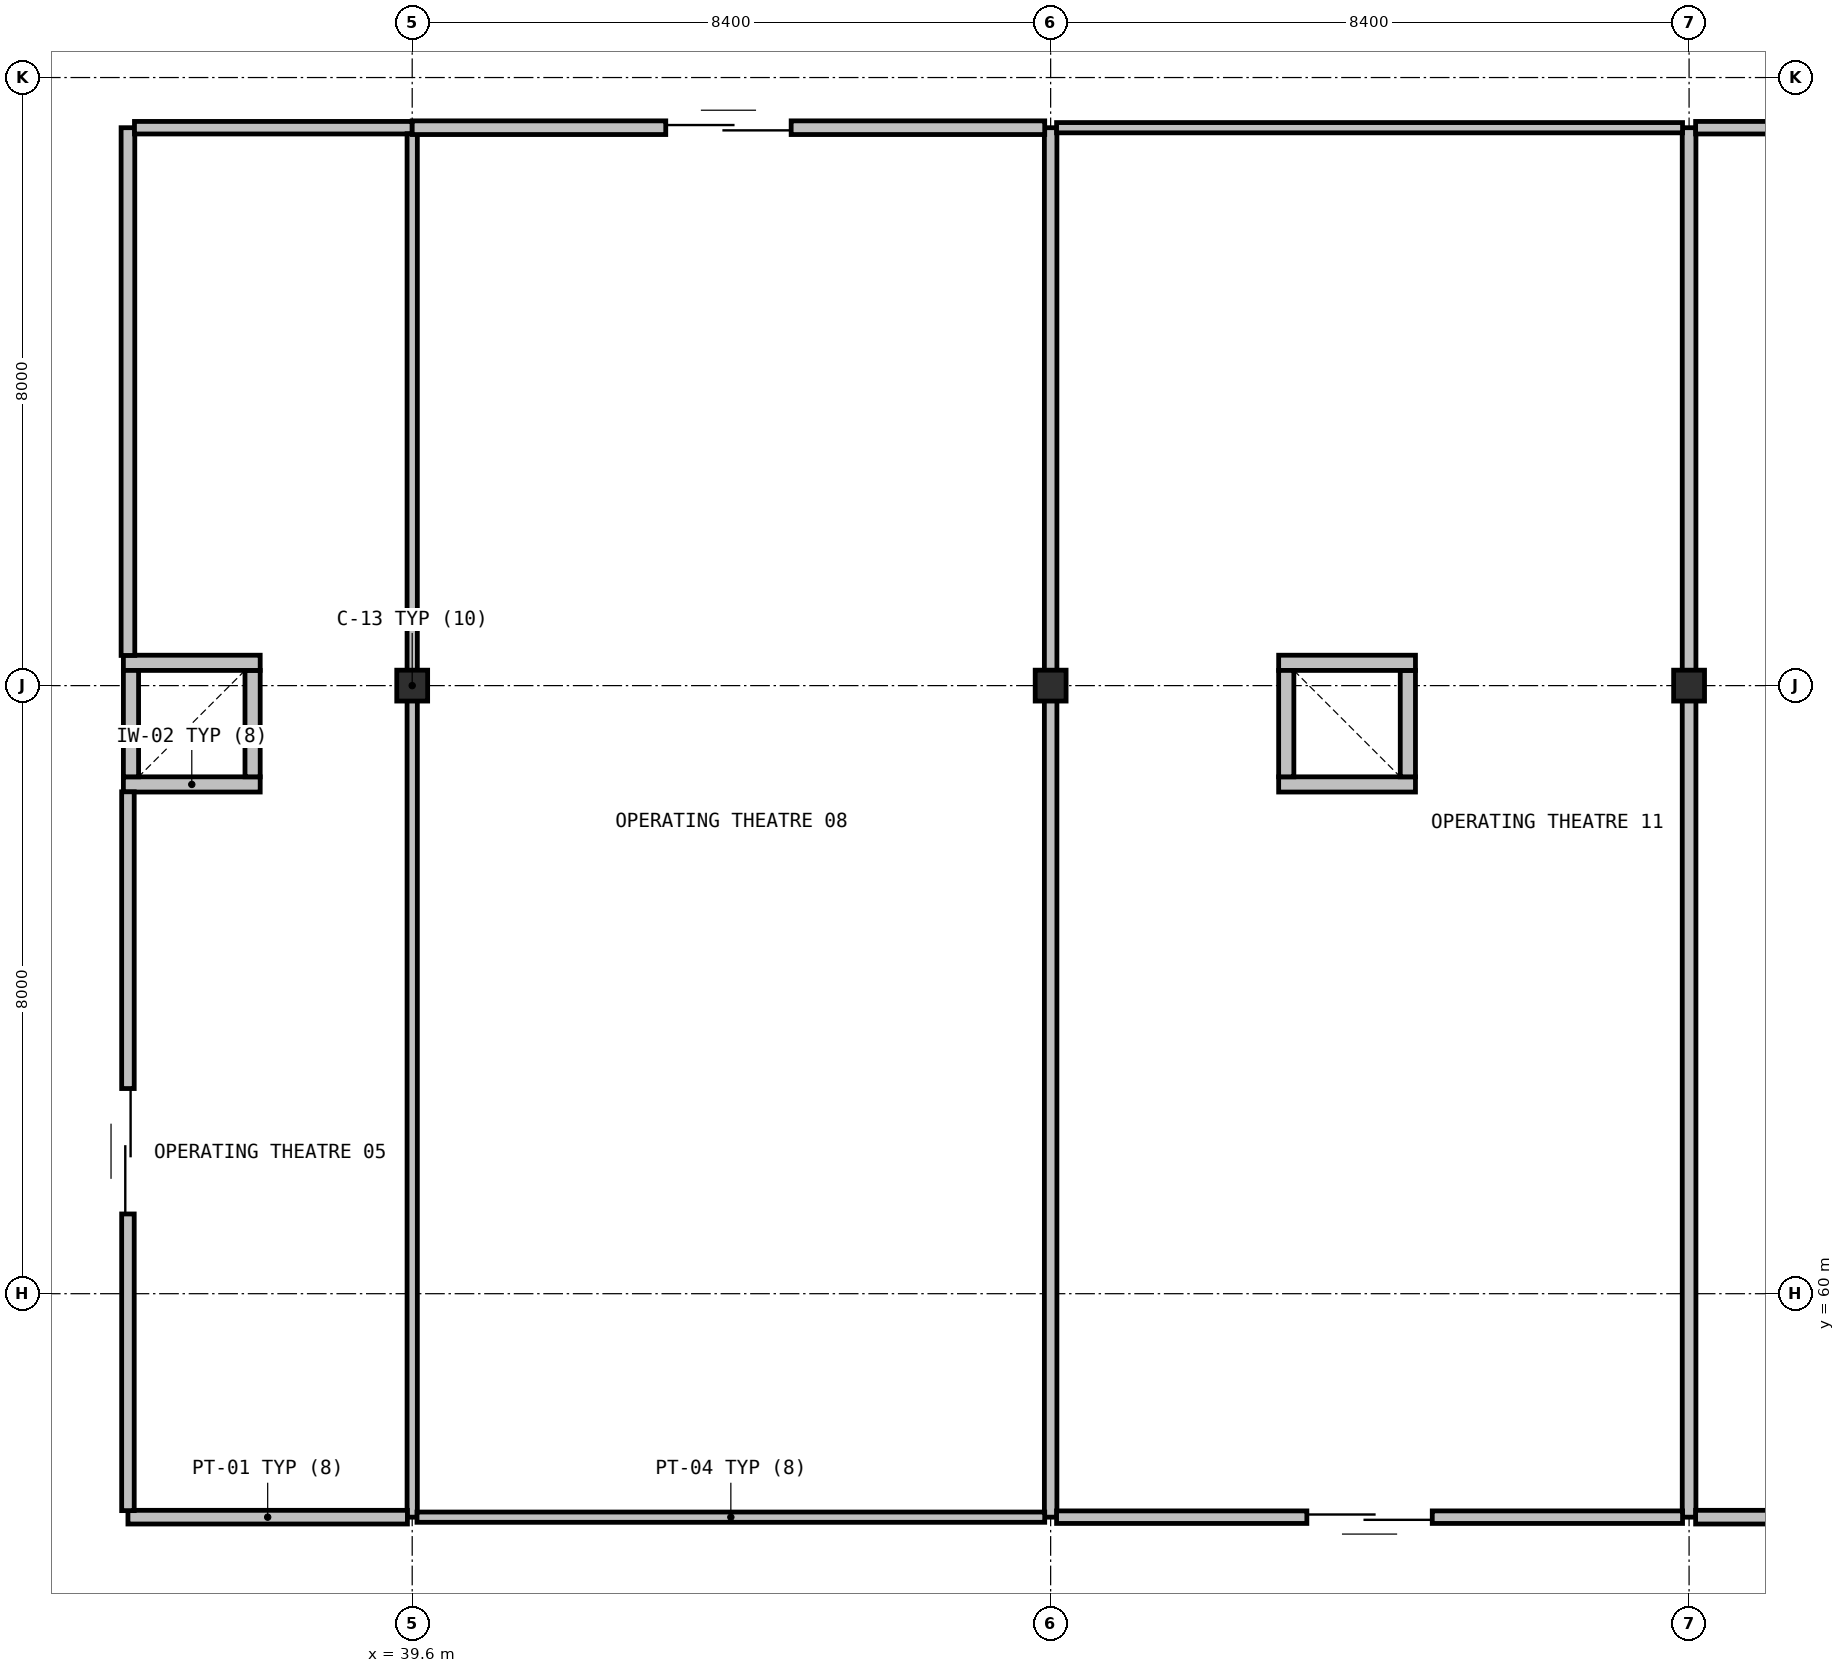
"""IFC4 building model, lengths in metres.
Left out: names, types, materials, properties, quantities, classifications, styles, units other than length and angle.
Written with IfcOpenShell. Run it as: python <this file> out.ifc"""

import sys

from ifc_helpers import new_model, si_unit, direction, frame, frame_2d, origin, origin_2d, place, context, subcontext, project, spatial, rectangle, hollow_circle, extrude, element, fill, save


model = new_model("IFC4")
c1 = context("Model", 3, precision=1e-05, world=origin(), true_north=direction((0.0, 1.0)))
c2 = subcontext(c1, "Body", "Model", "MODEL_VIEW")
j1 = project(units=[si_unit("LENGTHUNIT", "METRE"), si_unit("PLANEANGLEUNIT", "RADIAN")], contexts=[c1])
p1 = place(None, origin())
s1 = spatial("IfcSite", under=j1, at=p1, CompositionType="ELEMENT")
p2 = place(p1, origin())
s2 = spatial("IfcBuilding", under=s1, at=p2, CompositionType="ELEMENT")
p3 = place(p2, frame((0.0, 0.0, 10.2)))
s3 = spatial("IfcBuildingStorey", under=s2, at=p3, CompositionType="ELEMENT", Elevation=10.2)
for number, where, z_axis, x_axis in (
    (1, (39.6, 68.0, 0.0), (0.0, 0.0, 1.0), (1.0, 0.0, 0.0)),
    (2, (48.0, 68.0, 0.0), (0.0, 0.0, 1.0), (1.0, 0.0, 0.0)),
    (3, (56.4, 68.0, 0.0), (0.0, 0.0, 1.0), (1.0, 0.0, 0.0)),
):
    element("IfcColumn", number, at=place(p3, frame(where, z_axis=z_axis, x_axis=x_axis)), inside=s3, PredefinedType="COLUMN", context=c2, shape_type="SweptSolid", body=[
        extrude(hollow_circle(Radius=0.203, WallThickness=0.016, at=origin_2d()), origin(), (0.0, 0.0, 1.0), 4.8),
    ])
p4 = place(p3, frame((51.0, 66.7, 0.0), z_axis=(0.0, 0.0, 1.0), x_axis=(1.0, 0.0, 0.0)))
e4 = element("IfcWall", 4, at=p4, inside=s3, PredefinedType="SOLIDWALL", context=c2, shape_type="SweptSolid", body=[
    extrude(rectangle(XDim=1.8, YDim=0.2, at=frame_2d((0.9, 0.0))), origin(), (0.0, 0.0, 1.0), 4.46),
])
p5 = place(p3, frame((52.7, 66.8, 0.0), z_axis=(0.0, 0.0, 1.0), x_axis=(0.0, 1.0, 0.0)))
e5 = element("IfcWall", 5, at=p5, inside=s3, PredefinedType="SOLIDWALL", context=c2, shape_type="SweptSolid", body=[
    extrude(rectangle(XDim=1.4, YDim=0.2, at=frame_2d((0.7, 0.0))), origin(), (0.0, 0.0, 1.0), 4.46),
])
p6 = place(p3, frame((52.8, 68.3, 0.0), z_axis=(0.0, 0.0, 1.0), x_axis=(-1.0, 0.0, 0.0)))
e6 = element("IfcWall", 6, at=p6, inside=s3, PredefinedType="SOLIDWALL", context=c2, shape_type="SweptSolid", body=[
    extrude(rectangle(XDim=1.8, YDim=0.2, at=frame_2d((0.9, 0.0))), origin(), (0.0, 0.0, 1.0), 4.46),
])
p7 = place(p3, frame((51.1, 68.2, 0.0), z_axis=(0.0, 0.0, 1.0), x_axis=(0.0, -1.0, 0.0)))
e7 = element("IfcWall", 7, at=p7, inside=s3, PredefinedType="SOLIDWALL", context=c2, shape_type="SweptSolid", body=[
    extrude(rectangle(XDim=1.4, YDim=0.2, at=frame_2d((0.7, 0.0))), origin(), (0.0, 0.0, 1.0), 4.46),
])
p8 = place(p3, frame((35.8, 66.7, 0.0), z_axis=(0.0, 0.0, 1.0), x_axis=(1.0, 0.0, 0.0)))
e8 = element("IfcWall", 8, at=p8, inside=s3, PredefinedType="SOLIDWALL", context=c2, shape_type="SweptSolid", body=[
    extrude(rectangle(XDim=1.8, YDim=0.2, at=frame_2d((0.9, 0.0))), origin(), (0.0, 0.0, 1.0), 4.46),
])
p9 = place(p3, frame((37.5, 66.8, 0.0), z_axis=(0.0, 0.0, 1.0), x_axis=(0.0, 1.0, 0.0)))
e9 = element("IfcWall", 9, at=p9, inside=s3, PredefinedType="SOLIDWALL", context=c2, shape_type="SweptSolid", body=[
    extrude(rectangle(XDim=1.4, YDim=0.2, at=frame_2d((0.7, 0.0))), origin(), (0.0, 0.0, 1.0), 4.46),
])
p10 = place(p3, frame((37.6, 68.3, 0.0), z_axis=(0.0, 0.0, 1.0), x_axis=(-1.0, 0.0, 0.0)))
e10 = element("IfcWall", 10, at=p10, inside=s3, PredefinedType="SOLIDWALL", context=c2, shape_type="SweptSolid", body=[
    extrude(rectangle(XDim=1.8, YDim=0.2, at=frame_2d((0.9, 0.0))), origin(), (0.0, 0.0, 1.0), 4.46),
])
p11 = place(p3, frame((35.9, 68.2, 0.0), z_axis=(0.0, 0.0, 1.0), x_axis=(0.0, -1.0, 0.0)))
e11 = element("IfcWall", 11, at=p11, inside=s3, PredefinedType="SOLIDWALL", context=c2, shape_type="SweptSolid", body=[
    extrude(rectangle(XDim=1.4, YDim=0.2, at=frame_2d((0.7, 0.0))), origin(), (0.0, 0.0, 1.0), 4.46),
])
p12 = place(p3, frame((35.86, 68.397, 0.0), z_axis=(0.0, 0.0, 1.0), x_axis=(0.0, 1.0, 0.0)))
e12 = element("IfcWall", 12, at=p12, inside=s3, PredefinedType="PARTITIONING", context=c2, shape_type="SweptSolid", body=[
    extrude(rectangle(XDim=6.943, YDim=0.18, at=frame_2d((3.472, 0.0))), origin(), (0.0, 0.0, 1.0), 4.46),
])
p13 = place(p3, frame((35.946, 75.34, 0.0), z_axis=(0.0, 0.0, 1.0), x_axis=(1.0, 0.0, 0.0)))
e13 = element("IfcWall", 13, at=p13, inside=s3, PredefinedType="PARTITIONING", context=c2, shape_type="SweptSolid", body=[
    extrude(rectangle(XDim=3.654, YDim=0.165, at=frame_2d((1.827, 0.0))), origin(), (0.0, 0.0, 1.0), 4.46),
])
p14 = place(p3, frame((39.6, 75.261, 0.0), z_axis=(0.0, 0.0, 1.0), x_axis=(0.0, -1.0, 0.0)))
e14 = element("IfcWall", 14, at=p14, inside=s3, PredefinedType="PARTITIONING", context=c2, shape_type="SweptSolid", body=[
    extrude(rectangle(XDim=18.201, YDim=0.135, at=frame_2d((9.101, 0.0))), origin(), (0.0, 0.0, 1.0), 3.665),
])
p15 = place(p3, frame((39.537, 57.06, 0.0), z_axis=(0.0, 0.0, 1.0), x_axis=(-1.0, 0.0, 0.0)))
e15 = element("IfcWall", 15, at=p15, inside=s3, PredefinedType="PARTITIONING", context=c2, shape_type="SweptSolid", body=[
    extrude(rectangle(XDim=3.677, YDim=0.18, at=frame_2d((1.838, 0.0))), origin(), (0.0, 0.0, 1.0), 4.46),
])
p16 = place(p3, frame((35.86, 57.146, 0.0), z_axis=(0.0, 0.0, 1.0), x_axis=(0.0, 1.0, 0.0)))
e16 = element("IfcWall", 16, at=p16, inside=s3, PredefinedType="PARTITIONING", context=c2, shape_type="SweptSolid", body=[
    extrude(rectangle(XDim=9.457, YDim=0.165, at=frame_2d((4.729, 0.0))), origin(), (0.0, 0.0, 1.0), 4.46),
])
p17 = place(p16, frame((3.903, 0.0, 0.0)))
e17 = element("IfcOpeningElement", 17, at=p17, cuts=e16, PredefinedType="OPENING", context=c2, shape_type="SweptSolid", body=[
    extrude(rectangle(XDim=1.65, YDim=2.2, at=frame_2d((0.825, 1.1))), frame((0.0, 0.093, 0.0), z_axis=(0.0, -1.0, 0.0), x_axis=(1.0, 0.0, 0.0)), (0.0, 0.0, 1.0), 0.185),
])
p18 = place(p3, frame((48.0, 75.34, 0.0), z_axis=(0.0, 0.0, 1.0), x_axis=(0.0, -1.0, 0.0)))
e18 = element("IfcWall", 18, at=p18, inside=s3, PredefinedType="PARTITIONING", context=c2, shape_type="SweptSolid", body=[
    extrude(rectangle(XDim=18.28, YDim=0.165, at=frame_2d((9.14, 0.0))), origin(), (0.0, 0.0, 1.0), 3.665),
])
p19 = place(p3, frame((47.922, 57.06, 0.0), z_axis=(0.0, 0.0, 1.0), x_axis=(-1.0, 0.0, 0.0)))
e19 = element("IfcWall", 19, at=p19, inside=s3, PredefinedType="PARTITIONING", context=c2, shape_type="SweptSolid", body=[
    extrude(rectangle(XDim=8.259, YDim=0.135, at=frame_2d((4.129, 0.0))), origin(), (0.0, 0.0, 1.0), 4.46),
])
p20 = place(p3, frame((39.6, 75.34, 0.0), z_axis=(0.0, 0.0, 1.0), x_axis=(1.0, 0.0, 0.0)))
e20 = element("IfcWall", 20, at=p20, inside=s3, PredefinedType="PARTITIONING", context=c2, shape_type="SweptSolid", body=[
    extrude(rectangle(XDim=8.322, YDim=0.18, at=frame_2d((4.161, 0.0))), origin(), (0.0, 0.0, 1.0), 4.46),
])
p21 = place(p20, frame((3.336, 0.0, 0.0)))
e21 = element("IfcOpeningElement", 21, at=p21, cuts=e20, PredefinedType="OPENING", context=c2, shape_type="SweptSolid", body=[
    extrude(rectangle(XDim=1.65, YDim=2.2, at=frame_2d((0.825, 1.1))), frame((0.0, 0.1, 0.0), z_axis=(0.0, -1.0, 0.0), x_axis=(1.0, 0.0, 0.0)), (0.0, 0.0, 1.0), 0.2),
])
p22 = place(p3, frame((56.4, 75.34, 0.0), z_axis=(0.0, 0.0, 1.0), x_axis=(0.0, -1.0, 0.0)))
e22 = element("IfcWall", 22, at=p22, inside=s3, PredefinedType="PARTITIONING", context=c2, shape_type="SweptSolid", body=[
    extrude(rectangle(XDim=18.28, YDim=0.18, at=frame_2d((9.14, 0.0))), origin(), (0.0, 0.0, 1.0), 3.665),
])
p23 = place(p3, frame((56.314, 57.06, 0.0), z_axis=(0.0, 0.0, 1.0), x_axis=(-1.0, 0.0, 0.0)))
e23 = element("IfcWall", 23, at=p23, inside=s3, PredefinedType="PARTITIONING", context=c2, shape_type="SweptSolid", body=[
    extrude(rectangle(XDim=8.236, YDim=0.165, at=frame_2d((4.118, 0.0))), origin(), (0.0, 0.0, 1.0), 4.46),
])
p24 = place(p23, frame((3.293, 0.0, 0.0)))
e24 = element("IfcOpeningElement", 24, at=p24, cuts=e23, PredefinedType="OPENING", context=c2, shape_type="SweptSolid", body=[
    extrude(rectangle(XDim=1.65, YDim=2.2, at=frame_2d((0.825, 1.1))), frame((0.0, 0.093, 0.0), z_axis=(0.0, -1.0, 0.0), x_axis=(1.0, 0.0, 0.0)), (0.0, 0.0, 1.0), 0.185),
])
p25 = place(p3, frame((48.078, 75.34, 0.0), z_axis=(0.0, 0.0, 1.0), x_axis=(1.0, 0.0, 0.0)))
e25 = element("IfcWall", 25, at=p25, inside=s3, PredefinedType="PARTITIONING", context=c2, shape_type="SweptSolid", body=[
    extrude(rectangle(XDim=8.236, YDim=0.135, at=frame_2d((4.118, 0.0))), origin(), (0.0, 0.0, 1.0), 4.46),
])
p26 = place(p3, frame((64.736, 57.06, 0.0), z_axis=(0.0, 0.0, 1.0), x_axis=(-1.0, 0.0, 0.0)))
e26 = element("IfcWall", 26, at=p26, inside=s3, PredefinedType="PARTITIONING", context=c2, shape_type="SweptSolid", body=[
    extrude(rectangle(XDim=8.25, YDim=0.18, at=frame_2d((4.125, 0.0))), origin(), (0.0, 0.0, 1.0), 4.46),
])
p27 = place(p26, frame((3.3, 0.0, 0.0)))
e27 = element("IfcOpeningElement", 27, at=p27, cuts=e26, PredefinedType="OPENING", context=c2, shape_type="SweptSolid", body=[
    extrude(rectangle(XDim=1.65, YDim=2.2, at=frame_2d((0.825, 1.1))), frame((0.0, 0.1, 0.0), z_axis=(0.0, -1.0, 0.0), x_axis=(1.0, 0.0, 0.0)), (0.0, 0.0, 1.0), 0.2),
])
p28 = place(p3, frame((56.486, 75.34, 0.0), z_axis=(0.0, 0.0, 1.0), x_axis=(1.0, 0.0, 0.0)))
e28 = element("IfcWall", 28, at=p28, inside=s3, PredefinedType="PARTITIONING", context=c2, shape_type="SweptSolid", body=[
    extrude(rectangle(XDim=8.25, YDim=0.165, at=frame_2d((4.125, 0.0))), origin(), (0.0, 0.0, 1.0), 4.46),
])
p29 = place(p17, origin())
e29 = element("IfcDoor", 29, at=p29, inside=s3, OperationType="DOUBLE_DOOR_SLIDING", PredefinedType="DOOR", context=c2, shape_type="SweptSolid", body=[
    extrude(rectangle(XDim=1.65, YDim=2.2, at=frame_2d((0.825, 1.1))), frame((0.0, 0.025, 0.0), z_axis=(0.0, -1.0, 0.0), x_axis=(1.0, 0.0, 0.0)), (0.0, 0.0, 1.0), 0.05),
])
fill(e17, e29)
p30 = place(p21, origin())
e30 = element("IfcDoor", 30, at=p30, inside=s3, OperationType="DOUBLE_DOOR_SLIDING", PredefinedType="DOOR", context=c2, shape_type="SweptSolid", body=[
    extrude(rectangle(XDim=1.65, YDim=2.2, at=frame_2d((0.825, 1.1))), frame((0.0, 0.025, 0.0), z_axis=(0.0, -1.0, 0.0), x_axis=(1.0, 0.0, 0.0)), (0.0, 0.0, 1.0), 0.05),
])
fill(e21, e30)
p31 = place(p24, origin())
e31 = element("IfcDoor", 31, at=p31, inside=s3, OperationType="DOUBLE_DOOR_SLIDING", PredefinedType="DOOR", context=c2, shape_type="SweptSolid", body=[
    extrude(rectangle(XDim=1.65, YDim=2.2, at=frame_2d((0.825, 1.1))), frame((0.0, 0.025, 0.0), z_axis=(0.0, -1.0, 0.0), x_axis=(1.0, 0.0, 0.0)), (0.0, 0.0, 1.0), 0.05),
])
fill(e24, e31)
save(model, sys.argv[1])
